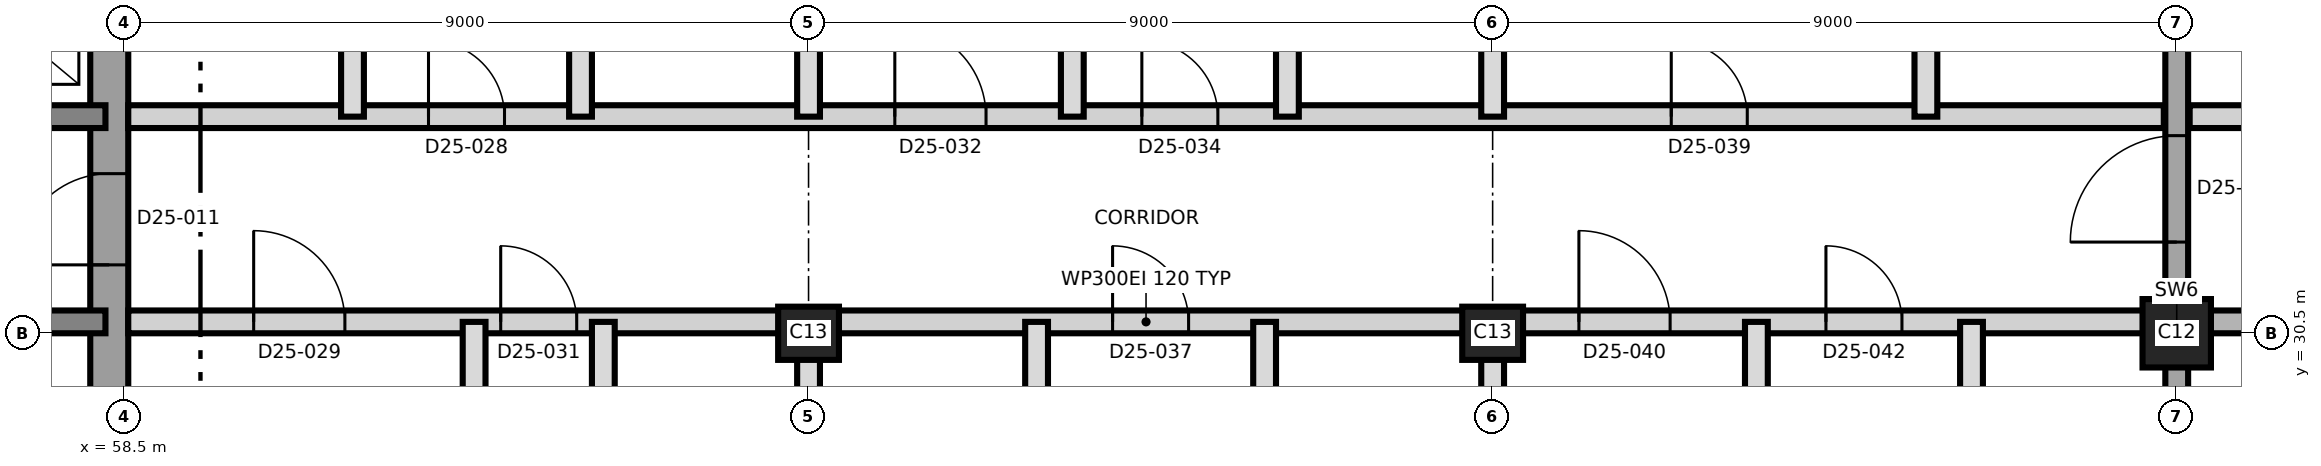
"""IFC4 building model, lengths in metres.
Left out: names, types, materials, properties, quantities, classifications, styles, units other than length and angle.
Written with IfcOpenShell. Run it as: python <this file> out.ifc"""

import sys

from ifc_helpers import new_model, si_unit, direction, frame, frame_2d, origin, origin_2d, place, context, subcontext, project, spatial, rectangle, extrude, element, fill, save


model = new_model("IFC4")
c1 = context("Model", 3, precision=1e-05, world=origin(), true_north=direction((0.0, 1.0)))
c2 = subcontext(c1, "Body", "Model", "MODEL_VIEW")
j1 = project(units=[si_unit("LENGTHUNIT", "METRE"), si_unit("PLANEANGLEUNIT", "RADIAN")], contexts=[c1])
p1 = place(None, origin())
s1 = spatial("IfcSite", under=j1, at=p1, CompositionType="ELEMENT")
p2 = place(p1, origin())
s2 = spatial("IfcBuilding", under=s1, at=p2, CompositionType="ELEMENT")
p3 = place(p2, frame((0.0, 0.0, 225.4)))
s3 = spatial("IfcBuildingStorey", under=s2, at=p3, CompositionType="ELEMENT", Elevation=225.4)
p4 = place(p3, frame((58.3, 21.25, 0.0), z_axis=(0.0, 0.0, 1.0), x_axis=(0.0, 1.0, 0.0)))
e1 = element("IfcWall", 1, at=p4, inside=s3, PredefinedType="SHEAR", context=c2, shape_type="SweptSolid", body=[
    extrude(rectangle(XDim=18.5, YDim=0.5, at=frame_2d((9.25, 0.0))), origin(), (0.0, 0.0, 1.0), 3.7),
])
p5 = place(p4, frame((10.15, 0.0, 0.0)))
e2 = element("IfcOpeningElement", 2, at=p5, cuts=e1, PredefinedType="OPENING", context=c2, shape_type="SweptSolid", body=[
    extrude(rectangle(XDim=1.2, YDim=2.1, at=frame_2d((0.6, 1.05))), frame((0.0, 0.26, 0.0), z_axis=(0.0, -1.0, 0.0), x_axis=(1.0, 0.0, 0.0)), (0.0, 0.0, 1.0), 0.52),
])
p6 = place(p3, frame((31.75, 30.65, 0.0), z_axis=(0.0, 0.0, 1.0), x_axis=(1.0, 0.0, 0.0)))
e3 = element("IfcWall", 3, at=p6, inside=s3, PredefinedType="SHEAR", context=c2, shape_type="SweptSolid", body=[
    extrude(rectangle(XDim=26.5, YDim=0.3, at=frame_2d((13.25, 0.0))), origin(), (0.0, 0.0, 1.0), 3.7),
])
p7 = place(p6, frame((24.75, 0.0, 0.0)))
e4 = element("IfcOpeningElement", 4, at=p7, cuts=e3, PredefinedType="OPENING", context=c2, shape_type="SweptSolid", body=[
    extrude(rectangle(XDim=1.0, YDim=2.1, at=frame_2d((0.5, 1.05))), frame((0.0, 0.16, 0.0), z_axis=(0.0, -1.0, 0.0), x_axis=(1.0, 0.0, 0.0)), (0.0, 0.0, 1.0), 0.32),
])
p8 = place(p6, frame((4.05, 0.0, 0.0)))
e5 = element("IfcOpeningElement", 5, at=p8, cuts=e3, PredefinedType="OPENING", context=c2, shape_type="SweptSolid", body=[
    extrude(rectangle(XDim=1.0, YDim=2.1, at=frame_2d((0.5, 1.05))), frame((0.0, 0.16, 0.0), z_axis=(0.0, -1.0, 0.0), x_axis=(1.0, 0.0, 0.0)), (0.0, 0.0, 1.0), 0.32),
])
p9 = place(p3, frame((31.75, 33.35, 0.0), z_axis=(0.0, 0.0, 1.0), x_axis=(1.0, 0.0, 0.0)))
e6 = element("IfcWall", 6, at=p9, inside=s3, PredefinedType="SHEAR", context=c2, shape_type="SweptSolid", body=[
    extrude(rectangle(XDim=26.5, YDim=0.3, at=frame_2d((13.25, 0.0))), origin(), (0.0, 0.0, 1.0), 3.7),
])
p10 = place(p9, frame((13.9, 0.0, 0.0)))
e7 = element("IfcOpeningElement", 7, at=p10, cuts=e6, PredefinedType="OPENING", context=c2, shape_type="SweptSolid", body=[
    extrude(rectangle(XDim=1.4, YDim=2.1, at=frame_2d((0.7, 1.05))), frame((0.0, 0.16, 0.0), z_axis=(0.0, -1.0, 0.0), x_axis=(1.0, 0.0, 0.0)), (0.0, 0.0, 1.0), 0.32),
])
p11 = place(p9, frame((5.375, 0.0, 0.0)))
e8 = element("IfcOpeningElement", 8, at=p11, cuts=e6, PredefinedType="OPENING", context=c2, shape_type="SweptSolid", body=[
    extrude(rectangle(XDim=1.2, YDim=2.1, at=frame_2d((0.6, 1.05))), frame((0.0, 0.16, 0.0), z_axis=(0.0, -1.0, 0.0), x_axis=(1.0, 0.0, 0.0)), (0.0, 0.0, 1.0), 0.32),
])
p12 = place(p9, frame((19.925, 0.0, 0.0)))
e9 = element("IfcOpeningElement", 9, at=p12, cuts=e6, PredefinedType="OPENING", context=c2, shape_type="SweptSolid", body=[
    extrude(rectangle(XDim=1.2, YDim=2.1, at=frame_2d((0.6, 1.05))), frame((0.0, 0.16, 0.0), z_axis=(0.0, -1.0, 0.0), x_axis=(1.0, 0.0, 0.0)), (0.0, 0.0, 1.0), 0.32),
])
for number, where, z_axis, x_axis in (
    (10, (67.5, 30.5, 0.0), (0.0, 0.0, 1.0), (1.0, 0.0, 0.0)),
    (11, (76.5, 30.5, 0.0), (0.0, 0.0, 1.0), (1.0, 0.0, 0.0)),
):
    element("IfcColumn", number, at=place(p3, frame(where, z_axis=z_axis, x_axis=x_axis)), inside=s3, PredefinedType="COLUMN", context=c2, shape_type="SweptSolid", body=[
        extrude(rectangle(XDim=0.8, YDim=0.7, at=origin_2d()), origin(), (0.0, 0.0, 1.0), 3.7),
    ])
p13 = place(p3, frame((85.5, 30.5, 0.0), z_axis=(0.0, 0.0, 1.0), x_axis=(1.0, 0.0, 0.0)))
e12 = element("IfcColumn", 12, at=p13, inside=s3, PredefinedType="COLUMN", context=c2, shape_type="SweptSolid", body=[
    extrude(rectangle(XDim=0.9, YDim=0.9, at=origin_2d()), origin(), (0.0, 0.0, 1.0), 3.7),
])
p14 = place(p3, frame((85.5, 20.35, 0.0), z_axis=(0.0, 0.0, 1.0), x_axis=(0.0, 1.0, 0.0)))
e13 = element("IfcWall", 13, at=p14, inside=s3, PredefinedType="SHEAR", context=c2, shape_type="SweptSolid", body=[
    extrude(rectangle(XDim=20.3, YDim=0.3, at=frame_2d((10.15, 0.0))), origin(), (0.0, 0.0, 1.0), 3.7),
])
p15 = place(p14, frame((11.35, 0.0, 0.0)))
e14 = element("IfcOpeningElement", 14, at=p15, cuts=e13, PredefinedType="OPENING", context=c2, shape_type="SweptSolid", body=[
    extrude(rectangle(XDim=1.4, YDim=2.1, at=frame_2d((0.7, 1.05))), frame((0.0, 0.16, 0.0), z_axis=(0.0, -1.0, 0.0), x_axis=(1.0, 0.0, 0.0)), (0.0, 0.0, 1.0), 0.32),
])
p16 = place(p3, frame((58.55, 30.65, 0.0), z_axis=(0.0, 0.0, 1.0), x_axis=(1.0, 0.0, 0.0)))
e15 = element("IfcWall", 15, at=p16, inside=s3, PredefinedType="PARTITIONING", context=c2, shape_type="SweptSolid", body=[
    extrude(rectangle(XDim=26.78, YDim=0.3, at=frame_2d((13.39, 0.0))), origin(), (0.0, 0.0, 1.0), 3.4),
])
p17 = place(p16, frame((1.65, 0.0, 0.0)))
e16 = element("IfcOpeningElement", 16, at=p17, cuts=e15, PredefinedType="OPENING", context=c2, shape_type="SweptSolid", body=[
    extrude(rectangle(XDim=1.2, YDim=2.1, at=frame_2d((0.6, 1.05))), frame((0.0, 0.16, 0.0), z_axis=(0.0, -1.0, 0.0), x_axis=(1.0, 0.0, 0.0)), (0.0, 0.0, 1.0), 0.32),
])
p18 = place(p16, frame((4.9, 0.0, 0.0)))
e17 = element("IfcOpeningElement", 17, at=p18, cuts=e15, PredefinedType="OPENING", context=c2, shape_type="SweptSolid", body=[
    extrude(rectangle(XDim=1.0, YDim=2.1, at=frame_2d((0.5, 1.05))), frame((0.0, 0.16, 0.0), z_axis=(0.0, -1.0, 0.0), x_axis=(1.0, 0.0, 0.0)), (0.0, 0.0, 1.0), 0.32),
])
p19 = place(p16, frame((12.95, 0.0, 0.0)))
e18 = element("IfcOpeningElement", 18, at=p19, cuts=e15, PredefinedType="OPENING", context=c2, shape_type="SweptSolid", body=[
    extrude(rectangle(XDim=1.0, YDim=2.4, at=frame_2d((0.5, 1.2))), frame((0.0, 0.16, 0.0), z_axis=(0.0, -1.0, 0.0), x_axis=(1.0, 0.0, 0.0)), (0.0, 0.0, 1.0), 0.32),
])
p20 = place(p16, frame((19.085, 0.0, 0.0)))
e19 = element("IfcOpeningElement", 19, at=p20, cuts=e15, PredefinedType="OPENING", context=c2, shape_type="SweptSolid", body=[
    extrude(rectangle(XDim=1.2, YDim=2.1, at=frame_2d((0.6, 1.05))), frame((0.0, 0.16, 0.0), z_axis=(0.0, -1.0, 0.0), x_axis=(1.0, 0.0, 0.0)), (0.0, 0.0, 1.0), 0.32),
])
p21 = place(p16, frame((22.335, 0.0, 0.0)))
e20 = element("IfcOpeningElement", 20, at=p21, cuts=e15, PredefinedType="OPENING", context=c2, shape_type="SweptSolid", body=[
    extrude(rectangle(XDim=1.0, YDim=2.1, at=frame_2d((0.5, 1.05))), frame((0.0, 0.16, 0.0), z_axis=(0.0, -1.0, 0.0), x_axis=(1.0, 0.0, 0.0)), (0.0, 0.0, 1.0), 0.32),
])
p22 = place(p3, frame((85.67, 30.65, 0.0), z_axis=(0.0, 0.0, 1.0), x_axis=(1.0, 0.0, 0.0)))
e21 = element("IfcWall", 21, at=p22, inside=s3, PredefinedType="SHEAR", context=c2, shape_type="SweptSolid", body=[
    extrude(rectangle(XDim=9.58, YDim=0.3, at=frame_2d((4.79, 0.0))), origin(), (0.0, 0.0, 1.0), 3.4),
])
p23 = place(p22, frame((2.08, 0.0, 0.0)))
e22 = element("IfcOpeningElement", 22, at=p23, cuts=e21, PredefinedType="OPENING", context=c2, shape_type="SweptSolid", body=[
    extrude(rectangle(XDim=1.2, YDim=2.1, at=frame_2d((0.6, 1.05))), frame((0.0, 0.16, 0.0), z_axis=(0.0, -1.0, 0.0), x_axis=(1.0, 0.0, 0.0)), (0.0, 0.0, 1.0), 0.32),
])
p24 = place(p22, frame((5.63, 0.0, 0.0)))
e23 = element("IfcOpeningElement", 23, at=p24, cuts=e21, PredefinedType="OPENING", context=c2, shape_type="SweptSolid", body=[
    extrude(rectangle(XDim=1.0, YDim=2.1, at=frame_2d((0.5, 1.05))), frame((0.0, 0.16, 0.0), z_axis=(0.0, -1.0, 0.0), x_axis=(1.0, 0.0, 0.0)), (0.0, 0.0, 1.0), 0.32),
])
p25 = place(p3, frame((58.55, 33.35, 0.0), z_axis=(0.0, 0.0, 1.0), x_axis=(1.0, 0.0, 0.0)))
e24 = element("IfcWall", 24, at=p25, inside=s3, PredefinedType="PARTITIONING", context=c2, shape_type="SweptSolid", body=[
    extrude(rectangle(XDim=26.78, YDim=0.3, at=frame_2d((13.39, 0.0))), origin(), (0.0, 0.0, 1.0), 3.4),
])
p26 = place(p25, frame((3.95, 0.0, 0.0)))
e25 = element("IfcOpeningElement", 25, at=p26, cuts=e24, PredefinedType="OPENING", context=c2, shape_type="SweptSolid", body=[
    extrude(rectangle(XDim=1.0, YDim=2.4, at=frame_2d((0.5, 1.2))), frame((0.0, 0.16, 0.0), z_axis=(0.0, -1.0, 0.0), x_axis=(1.0, 0.0, 0.0)), (0.0, 0.0, 1.0), 0.32),
])
p27 = place(p25, frame((10.085, 0.0, 0.0)))
e26 = element("IfcOpeningElement", 26, at=p27, cuts=e24, PredefinedType="OPENING", context=c2, shape_type="SweptSolid", body=[
    extrude(rectangle(XDim=1.2, YDim=2.1, at=frame_2d((0.6, 1.05))), frame((0.0, 0.16, 0.0), z_axis=(0.0, -1.0, 0.0), x_axis=(1.0, 0.0, 0.0)), (0.0, 0.0, 1.0), 0.32),
])
p28 = place(p25, frame((13.335, 0.0, 0.0)))
e27 = element("IfcOpeningElement", 27, at=p28, cuts=e24, PredefinedType="OPENING", context=c2, shape_type="SweptSolid", body=[
    extrude(rectangle(XDim=1.0, YDim=2.1, at=frame_2d((0.5, 1.05))), frame((0.0, 0.16, 0.0), z_axis=(0.0, -1.0, 0.0), x_axis=(1.0, 0.0, 0.0)), (0.0, 0.0, 1.0), 0.32),
])
p29 = place(p25, frame((20.3, 0.0, 0.0)))
e28 = element("IfcOpeningElement", 28, at=p29, cuts=e24, PredefinedType="OPENING", context=c2, shape_type="SweptSolid", body=[
    extrude(rectangle(XDim=1.0, YDim=2.4, at=frame_2d((0.5, 1.2))), frame((0.0, 0.16, 0.0), z_axis=(0.0, -1.0, 0.0), x_axis=(1.0, 0.0, 0.0)), (0.0, 0.0, 1.0), 0.32),
])
p30 = place(p3, frame((85.67, 33.35, 0.0), z_axis=(0.0, 0.0, 1.0), x_axis=(1.0, 0.0, 0.0)))
e29 = element("IfcWall", 29, at=p30, inside=s3, PredefinedType="PARTITIONING", context=c2, shape_type="SweptSolid", body=[
    extrude(rectangle(XDim=9.58, YDim=0.3, at=frame_2d((4.79, 0.0))), origin(), (0.0, 0.0, 1.0), 3.4),
])
p31 = place(p30, frame((1.83, 0.0, 0.0)))
e30 = element("IfcOpeningElement", 30, at=p31, cuts=e29, PredefinedType="OPENING", context=c2, shape_type="SweptSolid", body=[
    extrude(rectangle(XDim=1.0, YDim=2.1, at=frame_2d((0.5, 1.05))), frame((0.0, 0.16, 0.0), z_axis=(0.0, -1.0, 0.0), x_axis=(1.0, 0.0, 0.0)), (0.0, 0.0, 1.0), 0.32),
])
p32 = place(p30, frame((5.63, 0.0, 0.0)))
e31 = element("IfcOpeningElement", 31, at=p32, cuts=e29, PredefinedType="OPENING", context=c2, shape_type="SweptSolid", body=[
    extrude(rectangle(XDim=1.0, YDim=2.1, at=frame_2d((0.5, 1.05))), frame((0.0, 0.16, 0.0), z_axis=(0.0, -1.0, 0.0), x_axis=(1.0, 0.0, 0.0)), (0.0, 0.0, 1.0), 0.32),
])
p33 = place(p3, frame((61.5, 33.35, 0.0), z_axis=(0.0, 0.0, 1.0), x_axis=(0.0, 1.0, 0.0)))
e32 = element("IfcWall", 32, at=p33, inside=s3, PredefinedType="PARTITIONING", context=c2, shape_type="SweptSolid", body=[
    extrude(rectangle(XDim=3.3, YDim=0.3, at=frame_2d((1.65, 0.0))), origin(), (0.0, 0.0, 1.0), 3.4),
])
p34 = place(p3, frame((63.1, 20.35, 0.0), z_axis=(0.0, 0.0, 1.0), x_axis=(0.0, 1.0, 0.0)))
e33 = element("IfcWall", 33, at=p34, inside=s3, PredefinedType="PARTITIONING", context=c2, shape_type="SweptSolid", body=[
    extrude(rectangle(XDim=10.3, YDim=0.3, at=frame_2d((5.15, 0.0))), origin(), (0.0, 0.0, 1.0), 3.4),
])
p35 = place(p3, frame((64.5, 33.35, 0.0), z_axis=(0.0, 0.0, 1.0), x_axis=(0.0, 1.0, 0.0)))
e34 = element("IfcWall", 34, at=p35, inside=s3, PredefinedType="PARTITIONING", context=c2, shape_type="SweptSolid", body=[
    extrude(rectangle(XDim=3.3, YDim=0.3, at=frame_2d((1.65, 0.0))), origin(), (0.0, 0.0, 1.0), 3.4),
])
p36 = place(p3, frame((64.8, 27.45, 0.0), z_axis=(0.0, 0.0, 1.0), x_axis=(0.0, 1.0, 0.0)))
e35 = element("IfcWall", 35, at=p36, inside=s3, PredefinedType="PARTITIONING", context=c2, shape_type="SweptSolid", body=[
    extrude(rectangle(XDim=3.2, YDim=0.3, at=frame_2d((1.6, 0.0))), origin(), (0.0, 0.0, 1.0), 3.4),
])
p37 = place(p3, frame((67.5, 20.35, 0.0), z_axis=(0.0, 0.0, 1.0), x_axis=(0.0, 1.0, 0.0)))
e36 = element("IfcWall", 36, at=p37, inside=s3, PredefinedType="PARTITIONING", context=c2, shape_type="SweptSolid", body=[
    extrude(rectangle(XDim=10.3, YDim=0.3, at=frame_2d((5.15, 0.0))), origin(), (0.0, 0.0, 1.0), 3.4),
])
p38 = place(p3, frame((67.5, 33.35, 0.0), z_axis=(0.0, 0.0, 1.0), x_axis=(0.0, 1.0, 0.0)))
e37 = element("IfcWall", 37, at=p38, inside=s3, PredefinedType="PARTITIONING", context=c2, shape_type="SweptSolid", body=[
    extrude(rectangle(XDim=7.48, YDim=0.3, at=frame_2d((3.74, 0.0))), origin(), (0.0, 0.0, 1.0), 3.4),
])
p39 = place(p3, frame((70.5, 27.35, 0.0), z_axis=(0.0, 0.0, 1.0), x_axis=(0.0, 1.0, 0.0)))
e38 = element("IfcWall", 38, at=p39, inside=s3, PredefinedType="PARTITIONING", context=c2, shape_type="SweptSolid", body=[
    extrude(rectangle(XDim=3.3, YDim=0.3, at=frame_2d((1.65, 0.0))), origin(), (0.0, 0.0, 1.0), 3.4),
])
p40 = place(p3, frame((70.97, 33.35, 0.0), z_axis=(0.0, 0.0, 1.0), x_axis=(0.0, 1.0, 0.0)))
e39 = element("IfcWall", 39, at=p40, inside=s3, PredefinedType="PARTITIONING", context=c2, shape_type="SweptSolid", body=[
    extrude(rectangle(XDim=7.48, YDim=0.3, at=frame_2d((3.74, 0.0))), origin(), (0.0, 0.0, 1.0), 3.4),
])
p41 = place(p3, frame((73.5, 27.35, 0.0), z_axis=(0.0, 0.0, 1.0), x_axis=(0.0, 1.0, 0.0)))
e40 = element("IfcWall", 40, at=p41, inside=s3, PredefinedType="PARTITIONING", context=c2, shape_type="SweptSolid", body=[
    extrude(rectangle(XDim=3.3, YDim=0.3, at=frame_2d((1.65, 0.0))), origin(), (0.0, 0.0, 1.0), 3.4),
])
p42 = place(p3, frame((73.8, 33.35, 0.0), z_axis=(0.0, 0.0, 1.0), x_axis=(0.0, 1.0, 0.0)))
e41 = element("IfcWall", 41, at=p42, inside=s3, PredefinedType="PARTITIONING", context=c2, shape_type="SweptSolid", body=[
    extrude(rectangle(XDim=3.2, YDim=0.3, at=frame_2d((1.6, 0.0))), origin(), (0.0, 0.0, 1.0), 3.4),
])
p43 = place(p3, frame((76.5, 20.35, 0.0), z_axis=(0.0, 0.0, 1.0), x_axis=(0.0, 1.0, 0.0)))
e42 = element("IfcWall", 42, at=p43, inside=s3, PredefinedType="PARTITIONING", context=c2, shape_type="SweptSolid", body=[
    extrude(rectangle(XDim=10.3, YDim=0.3, at=frame_2d((5.15, 0.0))), origin(), (0.0, 0.0, 1.0), 3.4),
])
p44 = place(p3, frame((76.5, 33.35, 0.0), z_axis=(0.0, 0.0, 1.0), x_axis=(0.0, 1.0, 0.0)))
e43 = element("IfcWall", 43, at=p44, inside=s3, PredefinedType="PARTITIONING", context=c2, shape_type="SweptSolid", body=[
    extrude(rectangle(XDim=7.48, YDim=0.3, at=frame_2d((3.74, 0.0))), origin(), (0.0, 0.0, 1.0), 3.4),
])
p45 = place(p3, frame((79.97, 20.35, 0.0), z_axis=(0.0, 0.0, 1.0), x_axis=(0.0, 1.0, 0.0)))
e44 = element("IfcWall", 44, at=p45, inside=s3, PredefinedType="PARTITIONING", context=c2, shape_type="SweptSolid", body=[
    extrude(rectangle(XDim=10.3, YDim=0.3, at=frame_2d((5.15, 0.0))), origin(), (0.0, 0.0, 1.0), 3.4),
])
p46 = place(p3, frame((82.2, 33.35, 0.0), z_axis=(0.0, 0.0, 1.0), x_axis=(0.0, 1.0, 0.0)))
e45 = element("IfcWall", 45, at=p46, inside=s3, PredefinedType="PARTITIONING", context=c2, shape_type="SweptSolid", body=[
    extrude(rectangle(XDim=3.5, YDim=0.3, at=frame_2d((1.75, 0.0))), origin(), (0.0, 0.0, 1.0), 3.4),
])
p47 = place(p3, frame((82.8, 27.45, 0.0), z_axis=(0.0, 0.0, 1.0), x_axis=(0.0, 1.0, 0.0)))
e46 = element("IfcWall", 46, at=p47, inside=s3, PredefinedType="PARTITIONING", context=c2, shape_type="SweptSolid", body=[
    extrude(rectangle(XDim=3.2, YDim=0.3, at=frame_2d((1.6, 0.0))), origin(), (0.0, 0.0, 1.0), 3.4),
])
p48 = place(p5, origin())
e47 = element("IfcDoor", 47, at=p48, inside=s3, OperationType="SINGLE_SWING_LEFT", PredefinedType="DOOR", context=c2, shape_type="SweptSolid", body=[
    extrude(rectangle(XDim=1.2, YDim=2.1, at=frame_2d((0.6, 1.05))), frame((0.0, 0.025, 0.0), z_axis=(0.0, -1.0, 0.0), x_axis=(1.0, 0.0, 0.0)), (0.0, 0.0, 1.0), 0.05),
])
fill(e2, e47)
p49 = place(p26, origin())
e48 = element("IfcDoor", 48, at=p49, inside=s3, OperationType="SINGLE_SWING_LEFT", PredefinedType="DOOR", context=c2, shape_type="SweptSolid", body=[
    extrude(rectangle(XDim=1.0, YDim=2.4, at=frame_2d((0.5, 1.2))), frame((0.0, 0.025, 0.0), z_axis=(0.0, -1.0, 0.0), x_axis=(1.0, 0.0, 0.0)), (0.0, 0.0, 1.0), 0.05),
])
fill(e25, e48)
p50 = place(p17, origin())
e49 = element("IfcDoor", 49, at=p50, inside=s3, OperationType="SINGLE_SWING_LEFT", PredefinedType="DOOR", context=c2, shape_type="SweptSolid", body=[
    extrude(rectangle(XDim=1.2, YDim=2.1, at=frame_2d((0.6, 1.05))), frame((0.0, 0.025, 0.0), z_axis=(0.0, -1.0, 0.0), x_axis=(1.0, 0.0, 0.0)), (0.0, 0.0, 1.0), 0.05),
])
fill(e16, e49)
p51 = place(p18, origin())
e50 = element("IfcDoor", 50, at=p51, inside=s3, OperationType="SINGLE_SWING_LEFT", PredefinedType="DOOR", context=c2, shape_type="SweptSolid", body=[
    extrude(rectangle(XDim=1.0, YDim=2.1, at=frame_2d((0.5, 1.05))), frame((0.0, 0.025, 0.0), z_axis=(0.0, -1.0, 0.0), x_axis=(1.0, 0.0, 0.0)), (0.0, 0.0, 1.0), 0.05),
])
fill(e17, e50)
p52 = place(p27, origin())
e51 = element("IfcDoor", 51, at=p52, inside=s3, OperationType="SINGLE_SWING_LEFT", PredefinedType="DOOR", context=c2, shape_type="SweptSolid", body=[
    extrude(rectangle(XDim=1.2, YDim=2.1, at=frame_2d((0.6, 1.05))), frame((0.0, 0.025, 0.0), z_axis=(0.0, -1.0, 0.0), x_axis=(1.0, 0.0, 0.0)), (0.0, 0.0, 1.0), 0.05),
])
fill(e26, e51)
p53 = place(p28, origin())
e52 = element("IfcDoor", 52, at=p53, inside=s3, OperationType="SINGLE_SWING_LEFT", PredefinedType="DOOR", context=c2, shape_type="SweptSolid", body=[
    extrude(rectangle(XDim=1.0, YDim=2.1, at=frame_2d((0.5, 1.05))), frame((0.0, 0.025, 0.0), z_axis=(0.0, -1.0, 0.0), x_axis=(1.0, 0.0, 0.0)), (0.0, 0.0, 1.0), 0.05),
])
fill(e27, e52)
p54 = place(p19, origin())
e53 = element("IfcDoor", 53, at=p54, inside=s3, OperationType="SINGLE_SWING_LEFT", PredefinedType="DOOR", context=c2, shape_type="SweptSolid", body=[
    extrude(rectangle(XDim=1.0, YDim=2.4, at=frame_2d((0.5, 1.2))), frame((0.0, 0.025, 0.0), z_axis=(0.0, -1.0, 0.0), x_axis=(1.0, 0.0, 0.0)), (0.0, 0.0, 1.0), 0.05),
])
fill(e18, e53)
p55 = place(p29, origin())
e54 = element("IfcDoor", 54, at=p55, inside=s3, OperationType="SINGLE_SWING_LEFT", PredefinedType="DOOR", context=c2, shape_type="SweptSolid", body=[
    extrude(rectangle(XDim=1.0, YDim=2.4, at=frame_2d((0.5, 1.2))), frame((0.0, 0.025, 0.0), z_axis=(0.0, -1.0, 0.0), x_axis=(1.0, 0.0, 0.0)), (0.0, 0.0, 1.0), 0.05),
])
fill(e28, e54)
p56 = place(p20, origin())
e55 = element("IfcDoor", 55, at=p56, inside=s3, OperationType="SINGLE_SWING_RIGHT", PredefinedType="DOOR", context=c2, shape_type="SweptSolid", body=[
    extrude(rectangle(XDim=1.2, YDim=2.1, at=frame_2d((0.6, 1.05))), frame((0.0, 0.025, 0.0), z_axis=(0.0, -1.0, 0.0), x_axis=(1.0, 0.0, 0.0)), (0.0, 0.0, 1.0), 0.05),
])
fill(e19, e55)
p57 = place(p21, origin())
e56 = element("IfcDoor", 56, at=p57, inside=s3, OperationType="SINGLE_SWING_LEFT", PredefinedType="DOOR", context=c2, shape_type="SweptSolid", body=[
    extrude(rectangle(XDim=1.0, YDim=2.1, at=frame_2d((0.5, 1.05))), frame((0.0, 0.025, 0.0), z_axis=(0.0, -1.0, 0.0), x_axis=(1.0, 0.0, 0.0)), (0.0, 0.0, 1.0), 0.05),
])
fill(e20, e56)
p58 = place(p15, origin())
e57 = element("IfcDoor", 57, at=p58, inside=s3, OperationType="SINGLE_SWING_RIGHT", PredefinedType="DOOR", context=c2, shape_type="SweptSolid", body=[
    extrude(rectangle(XDim=1.4, YDim=2.1, at=frame_2d((0.7, 1.05))), frame((0.0, 0.025, 0.0), z_axis=(0.0, -1.0, 0.0), x_axis=(1.0, 0.0, 0.0)), (0.0, 0.0, 1.0), 0.05),
])
fill(e14, e57)
save(model, sys.argv[1])
